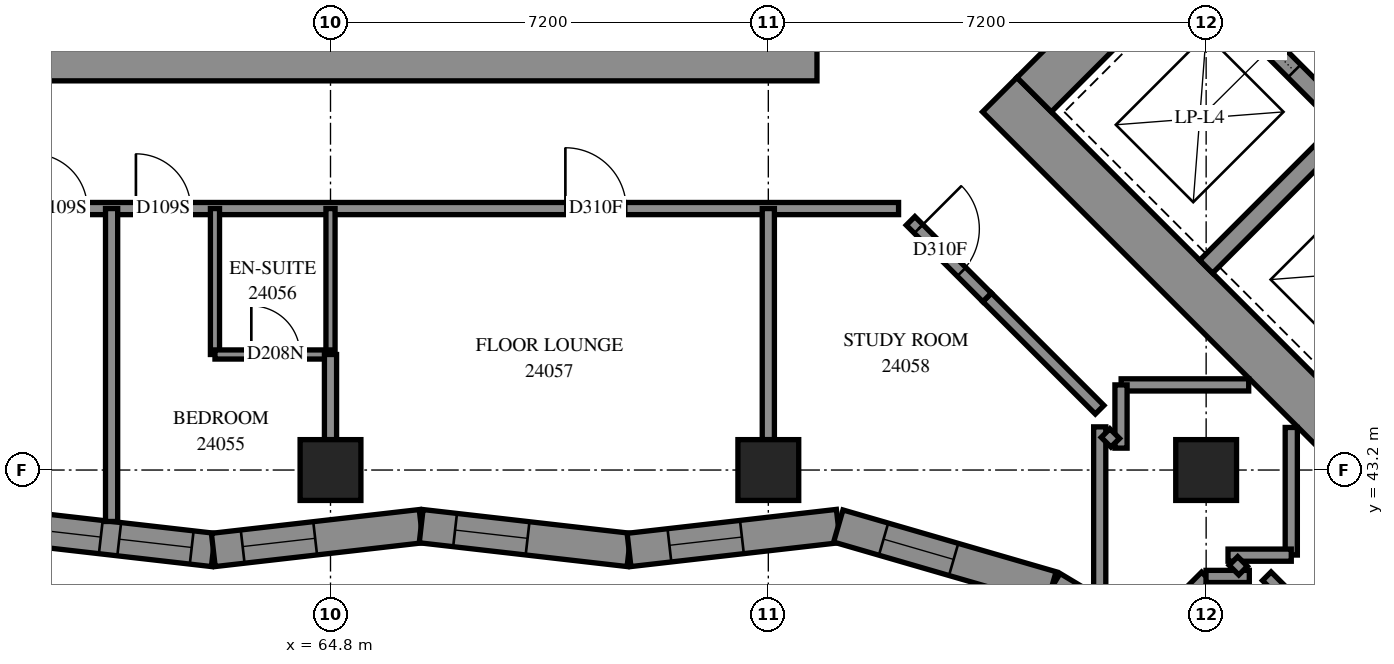
"""IFC4 building model, lengths in metres.
Left out: names, types, materials, properties, quantities, classifications, styles, units other than length and angle.
Written with IfcOpenShell. Run it as: python <this file> out.ifc"""

import sys

from ifc_helpers import new_model, si_unit, direction, frame, frame_2d, origin, origin_2d, place, context, subcontext, project, spatial, polyline, rectangle, outline, extrude, element, fill, save


model = new_model("IFC4")
c1 = context("Model", 3, precision=1e-05, world=origin(), true_north=direction((0.0, 1.0)))
c2 = subcontext(c1, "Body", "Model", "MODEL_VIEW")
j1 = project(units=[si_unit("LENGTHUNIT", "METRE"), si_unit("PLANEANGLEUNIT", "RADIAN")], contexts=[c1])
p1 = place(None, origin())
s1 = spatial("IfcSite", under=j1, at=p1, CompositionType="ELEMENT")
p2 = place(p1, origin())
s2 = spatial("IfcBuilding", under=s1, at=p2, CompositionType="ELEMENT")
p3 = place(p2, frame((0.0, 0.0, 91.4)))
s3 = spatial("IfcBuildingStorey", under=s2, at=p3, CompositionType="ELEMENT", Elevation=91.4)
for number, where, z_axis, x_axis in (
    (1, (64.8, 43.2, 0.0), (0.0, 0.0, 1.0), (1.0, 0.0, 0.0)),
    (2, (72.0, 43.2, 0.0), (0.0, 0.0, 1.0), (1.0, 0.0, 0.0)),
    (3, (79.2, 43.2, 0.0), (0.0, 0.0, 1.0), (1.0, 0.0, 0.0)),
):
    element("IfcColumn", number, at=place(p3, frame(where, z_axis=z_axis, x_axis=x_axis)), inside=s3, PredefinedType="COLUMN", context=c2, shape_type="SweptSolid", body=[
        extrude(rectangle(XDim=1.0, YDim=1.0, at=origin_2d()), origin(), (0.0, 0.0, 1.0), 3.1),
    ])
for number, where, z_axis, x_axis in (
    (4, (56.8, 50.0, -0.3), (0.0, 0.0, 1.0), (1.0, 0.0, 0.0)),
    (5, (75.806, 49.373, -0.3), (0.0, 0.0, 1.0), (0.707, -0.707, 0.0)),
):
    element("IfcWall", number, at=place(p3, frame(where, z_axis=z_axis, x_axis=x_axis)), inside=s3, PredefinedType="SHEAR", context=c2, shape_type="SweptSolid", body=[
        extrude(rectangle(XDim=16.0, YDim=0.8, at=frame_2d((8.0, 0.0))), origin(), (0.0, 0.0, 1.0), 2.7),
    ])
p4 = place(p3, frame((76.372, 49.373, -0.3), z_axis=(0.0, 0.0, 1.0), x_axis=(0.7071067812, 0.7071067812, 0.0)))
e6 = element("IfcWall", 6, at=p4, inside=s3, PredefinedType="SHEAR", context=c2, shape_type="SweptSolid", body=[
    extrude(rectangle(XDim=14.4, YDim=0.8, at=frame_2d((7.2, 0.0))), origin(), (0.0, 0.0, 1.0), 2.7),
])
p5 = place(p4, frame((4.55, 0.0, 0.3)))
e7 = element("IfcOpeningElement", 7, at=p5, cuts=e6, PredefinedType="OPENING", context=c2, shape_type="SweptSolid", body=[
    extrude(rectangle(XDim=1.1, YDim=2.1, at=frame_2d((0.55, 1.05))), frame((0.0, 0.41, 0.0), z_axis=(0.0, -1.0, 0.0), x_axis=(1.0, 0.0, 0.0)), (0.0, 0.0, 1.0), 0.82),
])
p6 = place(p4, frame((11.35, 0.0, 0.3)))
e8 = element("IfcOpeningElement", 8, at=p6, cuts=e6, PredefinedType="OPENING", context=c2, shape_type="SweptSolid", body=[
    extrude(rectangle(XDim=1.1, YDim=2.1, at=frame_2d((0.55, 1.05))), frame((0.0, 0.41, 0.0), z_axis=(0.0, -1.0, 0.0), x_axis=(1.0, 0.0, 0.0)), (0.0, 0.0, 1.0), 0.82),
])
p7 = place(p3, frame((79.2, 46.544, 0.0), z_axis=(0.0, 0.0, 1.0), x_axis=(0.7071219326, 0.7070916295, 0.0)))
e9 = element("IfcWall", 9, at=p7, inside=s3, PredefinedType="SOLIDWALL", context=c2, shape_type="SweptSolid", body=[
    extrude(rectangle(XDim=3.3, YDim=0.3, at=frame_2d((1.65, 0.0))), origin(), (0.0, 0.0, 1.0), 3.1),
])
p8 = place(p3, frame((78.988, 51.423, 0.0), z_axis=(0.0, 0.0, 1.0), x_axis=(0.7071067812, -0.7071067812, 0.0)))
e10 = element("IfcWall", 10, at=p8, inside=s3, PredefinedType="SOLIDWALL", context=c2, shape_type="SweptSolid", body=[
    extrude(rectangle(XDim=14.4, YDim=0.3, at=frame_2d((7.2, 0.0))), origin(), (0.0, 0.0, 1.0), 3.1),
])
p9 = place(p8, frame((1.25, 0.0, 0.0)))
e11 = element("IfcOpeningElement", 11, at=p9, cuts=e10, PredefinedType="OPENING", context=c2, shape_type="SweptSolid", body=[
    extrude(rectangle(XDim=1.1, YDim=2.1, at=frame_2d((0.55, 1.05))), frame((0.0, 0.16, 0.0), z_axis=(0.0, -1.0, 0.0), x_axis=(1.0, 0.0, 0.0)), (0.0, 0.0, 1.0), 0.32),
])
p10 = place(p8, frame((4.85, 0.0, 0.0)))
e12 = element("IfcOpeningElement", 12, at=p10, cuts=e10, PredefinedType="OPENING", context=c2, shape_type="SweptSolid", body=[
    extrude(rectangle(XDim=1.1, YDim=2.1, at=frame_2d((0.55, 1.05))), frame((0.0, 0.16, 0.0), z_axis=(0.0, -1.0, 0.0), x_axis=(1.0, 0.0, 0.0)), (0.0, 0.0, 1.0), 0.32),
])
p11 = place(p8, frame((8.45, 0.0, 0.0)))
e13 = element("IfcOpeningElement", 13, at=p11, cuts=e10, PredefinedType="OPENING", context=c2, shape_type="SweptSolid", body=[
    extrude(rectangle(XDim=1.1, YDim=2.1, at=frame_2d((0.55, 1.05))), frame((0.0, 0.16, 0.0), z_axis=(0.0, -1.0, 0.0), x_axis=(1.0, 0.0, 0.0)), (0.0, 0.0, 1.0), 0.32),
])
p12 = place(p8, frame((12.05, 0.0, 0.0)))
e14 = element("IfcOpeningElement", 14, at=p12, cuts=e10, PredefinedType="OPENING", context=c2, shape_type="SweptSolid", body=[
    extrude(rectangle(XDim=1.1, YDim=2.1, at=frame_2d((0.55, 1.05))), frame((0.0, 0.16, 0.0), z_axis=(0.0, -1.0, 0.0), x_axis=(1.0, 0.0, 0.0)), (0.0, 0.0, 1.0), 0.32),
])
p13 = place(p3, frame((59.455, 42.277, 0.0), z_axis=(0.0, 0.0, 1.0), x_axis=(0.9935212381, -0.1136465988, 0.0)))
e15 = element("IfcWall", 15, at=p13, inside=s3, PredefinedType="SOLIDWALL", context=c2, shape_type="SweptSolid", body=[
    extrude(outline(polyline([(0.032, -0.275), (3.472, -0.275), (3.409, 0.275), (-0.032, 0.275), (0.032, -0.275)])), origin(), (0.0, 0.0, 1.0), 3.1),
])
p14 = place(p13, frame((0.378, 0.0, 0.5)))
e16 = element("IfcOpeningElement", 16, at=p14, cuts=e15, PredefinedType="OPENING", context=c2, shape_type="SweptSolid", body=[
    extrude(rectangle(XDim=1.2, YDim=2.45, at=frame_2d((0.6, 1.225))), frame((0.0, 0.285, 0.0), z_axis=(0.0, -1.0, 0.0), x_axis=(1.0, 0.0, 0.0)), (0.0, 0.0, 1.0), 0.57),
])
p15 = place(p13, frame((1.883, 0.0, 0.5)))
e17 = element("IfcOpeningElement", 17, at=p15, cuts=e15, PredefinedType="OPENING", context=c2, shape_type="SweptSolid", body=[
    extrude(rectangle(XDim=1.2, YDim=2.45, at=frame_2d((0.6, 1.225))), frame((0.0, 0.285, 0.0), z_axis=(0.0, -1.0, 0.0), x_axis=(1.0, 0.0, 0.0)), (0.0, 0.0, 1.0), 0.57),
])
p16 = place(p3, frame((62.873, 41.886, 0.0), z_axis=(0.0, 0.0, 1.0), x_axis=(0.9935212381, 0.1136465988, 0.0)))
e18 = element("IfcWall", 18, at=p16, inside=s3, PredefinedType="SOLIDWALL", context=c2, shape_type="SweptSolid", body=[
    extrude(outline(polyline([(-0.032, -0.275), (3.409, -0.275), (3.472, 0.275), (0.032, 0.275), (-0.032, -0.275)])), origin(), (0.0, 0.0, 1.0), 3.1),
])
p17 = place(p16, frame((0.486, 0.0, 0.5)))
e19 = element("IfcOpeningElement", 19, at=p17, cuts=e18, PredefinedType="OPENING", context=c2, shape_type="SweptSolid", body=[
    extrude(rectangle(XDim=1.2, YDim=2.45, at=frame_2d((0.6, 1.225))), frame((0.0, 0.285, 0.0), z_axis=(0.0, -1.0, 0.0), x_axis=(1.0, 0.0, 0.0)), (0.0, 0.0, 1.0), 0.57),
])
p18 = place(p3, frame((66.291, 42.277, 0.0), z_axis=(0.0, 0.0, 1.0), x_axis=(0.9935212381, -0.1136465988, 0.0)))
e20 = element("IfcWall", 20, at=p18, inside=s3, PredefinedType="SOLIDWALL", context=c2, shape_type="SweptSolid", body=[
    extrude(outline(polyline([(0.032, -0.275), (3.472, -0.275), (3.409, 0.275), (-0.032, 0.275), (0.032, -0.275)])), origin(), (0.0, 0.0, 1.0), 3.1),
])
p19 = place(p18, frame((0.561, 0.0, 0.5)))
e21 = element("IfcOpeningElement", 21, at=p19, cuts=e20, PredefinedType="OPENING", context=c2, shape_type="SweptSolid", body=[
    extrude(rectangle(XDim=1.2, YDim=2.45, at=frame_2d((0.6, 1.225))), frame((0.0, 0.285, 0.0), z_axis=(0.0, -1.0, 0.0), x_axis=(1.0, 0.0, 0.0)), (0.0, 0.0, 1.0), 0.57),
])
p20 = place(p3, frame((69.709, 41.886, 0.0), z_axis=(0.0, 0.0, 1.0), x_axis=(0.9935208506, 0.1136499866, 0.0)))
e22 = element("IfcWall", 22, at=p20, inside=s3, PredefinedType="SOLIDWALL", context=c2, shape_type="SweptSolid", body=[
    extrude(outline(polyline([(-0.032, -0.275), (3.409, -0.275), (3.519, 0.275), (0.032, 0.275), (-0.032, -0.275)])), origin(), (0.0, 0.0, 1.0), 3.1),
])
p21 = place(p20, frame((0.669, 0.0, 0.5)))
e23 = element("IfcOpeningElement", 23, at=p21, cuts=e22, PredefinedType="OPENING", context=c2, shape_type="SweptSolid", body=[
    extrude(rectangle(XDim=1.2, YDim=2.45, at=frame_2d((0.6, 1.225))), frame((0.0, 0.285, 0.0), z_axis=(0.0, -1.0, 0.0), x_axis=(1.0, 0.0, 0.0)), (0.0, 0.0, 1.0), 0.57),
])
p22 = place(p3, frame((73.151, 42.279, 0.0), z_axis=(0.0, 0.0, 1.0), x_axis=(0.9604465079, -0.2784645497, 0.0)))
e24 = element("IfcWall", 24, at=p22, inside=s3, PredefinedType="SOLIDWALL", context=c2, shape_type="SweptSolid", body=[
    extrude(outline(polyline([(0.055, -0.275), (3.614, -0.275), (3.685, 0.275), (-0.055, 0.275), (0.055, -0.275)])), origin(), (0.0, 0.0, 1.0), 3.1),
])
p23 = place(p22, frame((0.775, 0.0, 0.5)))
e25 = element("IfcOpeningElement", 25, at=p23, cuts=e24, PredefinedType="OPENING", context=c2, shape_type="SweptSolid", body=[
    extrude(rectangle(XDim=1.2, YDim=2.45, at=frame_2d((0.6, 1.225))), frame((0.0, 0.285, 0.0), z_axis=(0.0, -1.0, 0.0), x_axis=(1.0, 0.0, 0.0)), (0.0, 0.0, 1.0), 0.57),
])
p24 = place(p3, frame((76.656, 41.263, 0.0), z_axis=(0.0, 0.0, 1.0), x_axis=(0.8580683787, -0.513535449, 0.0)))
e26 = element("IfcWall", 26, at=p24, inside=s3, PredefinedType="SOLIDWALL", context=c2, shape_type="SweptSolid", body=[
    extrude(outline(polyline([(0.036, -0.275), (4.104, -0.275), (4.199, 0.275), (-0.036, 0.275), (0.036, -0.275)])), origin(), (0.0, 0.0, 1.0), 3.1),
])
p25 = place(p24, frame((0.358, 0.0, 0.5)))
e27 = element("IfcOpeningElement", 27, at=p25, cuts=e26, PredefinedType="OPENING", context=c2, shape_type="SweptSolid", body=[
    extrude(rectangle(XDim=1.2, YDim=2.45, at=frame_2d((0.6, 1.225))), frame((0.0, 0.285, 0.0), z_axis=(0.0, -1.0, 0.0), x_axis=(1.0, 0.0, 0.0)), (0.0, 0.0, 1.0), 0.57),
])
p26 = place(p24, frame((2.234, 0.0, 0.5)))
e28 = element("IfcOpeningElement", 28, at=p26, cuts=e26, PredefinedType="OPENING", context=c2, shape_type="SweptSolid", body=[
    extrude(rectangle(XDim=1.2, YDim=2.45, at=frame_2d((0.6, 1.225))), frame((0.0, 0.285, 0.0), z_axis=(0.0, -1.0, 0.0), x_axis=(1.0, 0.0, 0.0)), (0.0, 0.0, 1.0), 0.57),
])
p27 = place(p3, frame((54.7, 47.5, 0.0), z_axis=(0.0, 0.0, 1.0), x_axis=(1.0, 0.0, 0.0)))
e29 = element("IfcWall", 29, at=p27, inside=s3, PredefinedType="PARTITIONING", context=c2, shape_type="SweptSolid", body=[
    extrude(rectangle(XDim=19.442, YDim=0.2, at=frame_2d((9.721, 0.0))), origin(), (0.0, 0.0, 1.0), 3.1),
])
p28 = place(p27, frame((5.2, 0.0, 0.0)))
e30 = element("IfcOpeningElement", 30, at=p28, cuts=e29, PredefinedType="OPENING", context=c2, shape_type="SweptSolid", body=[
    extrude(rectangle(XDim=0.9, YDim=2.1, at=frame_2d((0.45, 1.05))), frame((0.0, 0.11, 0.0), z_axis=(0.0, -1.0, 0.0), x_axis=(1.0, 0.0, 0.0)), (0.0, 0.0, 1.0), 0.22),
])
p29 = place(p27, frame((6.9, 0.0, 0.0)))
e31 = element("IfcOpeningElement", 31, at=p29, cuts=e29, PredefinedType="OPENING", context=c2, shape_type="SweptSolid", body=[
    extrude(rectangle(XDim=0.9, YDim=2.1, at=frame_2d((0.45, 1.05))), frame((0.0, 0.11, 0.0), z_axis=(0.0, -1.0, 0.0), x_axis=(1.0, 0.0, 0.0)), (0.0, 0.0, 1.0), 0.22),
])
p30 = place(p27, frame((13.963, 0.0, 0.0)))
e32 = element("IfcOpeningElement", 32, at=p30, cuts=e29, PredefinedType="OPENING", context=c2, shape_type="SweptSolid", body=[
    extrude(rectangle(XDim=1.0, YDim=2.1, at=frame_2d((0.5, 1.05))), frame((0.0, 0.11, 0.0), z_axis=(0.0, -1.0, 0.0), x_axis=(1.0, 0.0, 0.0)), (0.0, 0.0, 1.0), 0.22),
])
p31 = place(p3, frame((80.197, 41.453, 0.0), z_axis=(0.0, 0.0, 1.0), x_axis=(0.7071067812, -0.7071067812, 0.0)))
e33 = element("IfcWall", 33, at=p31, inside=s3, PredefinedType="PARTITIONING", context=c2, shape_type="SweptSolid", body=[
    extrude(rectangle(XDim=6.488, YDim=0.2, at=frame_2d((3.244, 0.0))), origin(), (0.0, 0.0, 1.0), 3.1),
])
p32 = place(p3, frame((61.2, 42.354, 0.0), z_axis=(0.0, 0.0, 1.0), x_axis=(0.0, 1.0, 0.0)))
e34 = element("IfcWall", 34, at=p32, inside=s3, PredefinedType="PARTITIONING", context=c2, shape_type="SweptSolid", body=[
    extrude(rectangle(XDim=5.146, YDim=0.2, at=frame_2d((2.573, 0.0))), origin(), (0.0, 0.0, 1.0), 3.1),
])
p33 = place(p3, frame((72.0, 43.7, 0.0), z_axis=(0.0, 0.0, 1.0), x_axis=(0.0, 1.0, 0.0)))
e35 = element("IfcWall", 35, at=p33, inside=s3, PredefinedType="PARTITIONING", context=c2, shape_type="SweptSolid", body=[
    extrude(rectangle(XDim=3.8, YDim=0.2, at=frame_2d((1.9, 0.0))), origin(), (0.0, 0.0, 1.0), 3.1),
])
p34 = place(p3, frame((77.45, 41.109, 0.0), z_axis=(0.0, 0.0, 1.0), x_axis=(0.0, 1.0, 0.0)))
e36 = element("IfcWall", 36, at=p34, inside=s3, PredefinedType="PARTITIONING", context=c2, shape_type="SweptSolid", body=[
    extrude(rectangle(XDim=2.801, YDim=0.2, at=frame_2d((1.401, 0.0))), origin(), (0.0, 0.0, 1.0), 3.1),
])
p35 = place(p3, frame((75.598, 46.04, 0.0), z_axis=(0.0, 0.0, 1.0), x_axis=(0.7074891043, -0.7067242512, 0.0)))
e37 = element("IfcWall", 37, at=p35, inside=s3, PredefinedType="PARTITIONING", context=c2, shape_type="SweptSolid", body=[
    extrude(rectangle(XDim=2.615, YDim=0.2, at=frame_2d((1.308, 0.0))), origin(), (0.0, 0.0, 1.0), 3.1),
])
for number, where, z_axis, x_axis in (
    (38, (62.9, 45.1, 0.0), (0.0, 0.0, 1.0), (0.0, 1.0, 0.0)),
    (39, (64.8, 45.1, 0.0), (0.0, 0.0, 1.0), (0.0, 1.0, 0.0)),
):
    element("IfcWall", number, at=place(p3, frame(where, z_axis=z_axis, x_axis=x_axis)), inside=s3, PredefinedType="PARTITIONING", context=c2, shape_type="SweptSolid", body=[
        extrude(rectangle(XDim=2.4, YDim=0.15, at=frame_2d((1.2, 0.0))), origin(), (0.0, 0.0, 1.0), 3.1),
    ])
for number, where, z_axis, x_axis in (
    (40, (77.802, 44.6, 0.0), (0.0, 0.0, 1.0), (1.0, 0.0, 0.0)),
    (41, (80.6, 41.802, 0.0), (0.0, 0.0, 1.0), (0.0, 1.0, 0.0)),
):
    element("IfcWall", number, at=place(p3, frame(where, z_axis=z_axis, x_axis=x_axis)), inside=s3, PredefinedType="PARTITIONING", context=c2, shape_type="SweptSolid", body=[
        extrude(rectangle(XDim=2.098, YDim=0.2, at=frame_2d((1.049, 0.0))), origin(), (0.0, 0.0, 1.0), 3.1),
    ])
p36 = place(p3, frame((62.9, 45.1, 0.0), z_axis=(0.0, 0.0, 1.0), x_axis=(1.0, 0.0, 0.0)))
e42 = element("IfcWall", 42, at=p36, inside=s3, PredefinedType="PARTITIONING", context=c2, shape_type="SweptSolid", body=[
    extrude(rectangle(XDim=1.9, YDim=0.15, at=frame_2d((0.95, 0.0))), origin(), (0.0, 0.0, 1.0), 3.1),
])
p37 = place(p36, frame((0.598, 0.0, 0.0)))
e43 = element("IfcOpeningElement", 43, at=p37, cuts=e42, PredefinedType="OPENING", context=c2, shape_type="SweptSolid", body=[
    extrude(rectangle(XDim=0.8, YDim=2.1, at=frame_2d((0.4, 1.05))), frame((0.0, 0.085, 0.0), z_axis=(0.0, -1.0, 0.0), x_axis=(1.0, 0.0, 0.0)), (0.0, 0.0, 1.0), 0.17),
])
p38 = place(p3, frame((74.339, 47.297, 0.0), z_axis=(0.0, 0.0, 1.0), x_axis=(0.7071067812, -0.7071067812, 0.0)))
e44 = element("IfcWall", 44, at=p38, inside=s3, PredefinedType="PARTITIONING", context=c2, shape_type="SweptSolid", body=[
    extrude(rectangle(XDim=1.779, YDim=0.2, at=frame_2d((0.889, 0.0))), origin(), (0.0, 0.0, 1.0), 3.1),
])
p39 = place(p38, frame((0.186, 0.0, 0.0)))
e45 = element("IfcOpeningElement", 45, at=p39, cuts=e44, PredefinedType="OPENING", context=c2, shape_type="SweptSolid", body=[
    extrude(rectangle(XDim=1.0, YDim=2.1, at=frame_2d((0.5, 1.05))), frame((0.0, 0.11, 0.0), z_axis=(0.0, -1.0, 0.0), x_axis=(1.0, 0.0, 0.0)), (0.0, 0.0, 1.0), 0.22),
])
p40 = place(p3, frame((64.8, 43.7, 0.0), z_axis=(0.0, 0.0, 1.0), x_axis=(0.0, 1.0, 0.0)))
e46 = element("IfcWall", 46, at=p40, inside=s3, PredefinedType="PARTITIONING", context=c2, shape_type="SweptSolid", body=[
    extrude(rectangle(XDim=1.4, YDim=0.2, at=frame_2d((0.7, 0.0))), origin(), (0.0, 0.0, 1.0), 3.1),
])
p41 = place(p3, frame((78.328, 40.583, 0.0), z_axis=(0.0, 0.0, 1.0), x_axis=(0.7071067812, 0.7071067812, 0.0)))
e47 = element("IfcWall", 47, at=p41, inside=s3, PredefinedType="PARTITIONING", context=c2, shape_type="SweptSolid", body=[
    extrude(rectangle(XDim=1.227, YDim=0.2, at=frame_2d((0.613, 0.0))), origin(), (0.0, 0.0, 1.0), 3.1),
])
for number, where, z_axis, x_axis in (
    (48, (77.8, 43.56, 0.0), (0.0, 0.0, 1.0), (0.0, 1.0, 0.0)),
    (49, (79.56, 41.8, 0.0), (0.0, 0.0, 1.0), (1.0, 0.0, 0.0)),
):
    element("IfcWall", number, at=place(p3, frame(where, z_axis=z_axis, x_axis=x_axis)), inside=s3, PredefinedType="PARTITIONING", context=c2, shape_type="SweptSolid", body=[
        extrude(rectangle(XDim=1.04, YDim=0.2, at=frame_2d((0.52, 0.0))), origin(), (0.0, 0.0, 1.0), 3.1),
    ])
p42 = place(p3, frame((79.198, 41.45, 0.0), z_axis=(0.0, 0.0, 1.0), x_axis=(1.0, 0.0, 0.0)))
e50 = element("IfcWall", 50, at=p42, inside=s3, PredefinedType="PARTITIONING", context=c2, shape_type="SweptSolid", body=[
    extrude(rectangle(XDim=0.712, YDim=0.2, at=frame_2d((0.356, 0.0))), origin(), (0.0, 0.0, 1.0), 3.1),
])
for number, where, z_axis, x_axis in (
    (51, (79.649, 41.705, 0.0), (0.0, 0.0, 1.0), (0.707, -0.707, 0.0)),
    (52, (77.546, 43.808, 0.0), (0.0, 0.0, 1.0), (0.707, -0.707, 0.0)),
):
    element("IfcWall", number, at=place(p3, frame(where, z_axis=z_axis, x_axis=x_axis)), inside=s3, PredefinedType="PARTITIONING", context=c2, shape_type="SweptSolid", body=[
        extrude(rectangle(XDim=0.225, YDim=0.2, at=frame_2d((0.112, 0.0))), origin(), (0.0, 0.0, 1.0), 3.1),
    ])
p43 = place(p14, origin())
e53 = element("IfcWindow", 53, at=p43, inside=s3, PartitioningType="SINGLE_PANEL", PredefinedType="WINDOW", context=c2, shape_type="SweptSolid", body=[
    extrude(rectangle(XDim=1.2, YDim=2.45, at=frame_2d((0.6, 1.225))), frame((0.0, 0.155, 0.0), z_axis=(0.0, -1.0, 0.0), x_axis=(1.0, 0.0, 0.0)), (0.0, 0.0, 1.0), 0.06),
])
fill(e16, e53)
p44 = place(p15, origin())
e54 = element("IfcWindow", 54, at=p44, inside=s3, PartitioningType="SINGLE_PANEL", PredefinedType="WINDOW", context=c2, shape_type="SweptSolid", body=[
    extrude(rectangle(XDim=1.2, YDim=2.45, at=frame_2d((0.6, 1.225))), frame((0.0, 0.155, 0.0), z_axis=(0.0, -1.0, 0.0), x_axis=(1.0, 0.0, 0.0)), (0.0, 0.0, 1.0), 0.06),
])
fill(e17, e54)
p45 = place(p17, origin())
e55 = element("IfcWindow", 55, at=p45, inside=s3, PartitioningType="SINGLE_PANEL", PredefinedType="WINDOW", context=c2, shape_type="SweptSolid", body=[
    extrude(rectangle(XDim=1.2, YDim=2.45, at=frame_2d((0.6, 1.225))), frame((0.0, 0.155, 0.0), z_axis=(0.0, -1.0, 0.0), x_axis=(1.0, 0.0, 0.0)), (0.0, 0.0, 1.0), 0.06),
])
fill(e19, e55)
p46 = place(p19, origin())
e56 = element("IfcWindow", 56, at=p46, inside=s3, PartitioningType="SINGLE_PANEL", PredefinedType="WINDOW", context=c2, shape_type="SweptSolid", body=[
    extrude(rectangle(XDim=1.2, YDim=2.45, at=frame_2d((0.6, 1.225))), frame((0.0, 0.155, 0.0), z_axis=(0.0, -1.0, 0.0), x_axis=(1.0, 0.0, 0.0)), (0.0, 0.0, 1.0), 0.06),
])
fill(e21, e56)
p47 = place(p21, origin())
e57 = element("IfcWindow", 57, at=p47, inside=s3, PartitioningType="SINGLE_PANEL", PredefinedType="WINDOW", context=c2, shape_type="SweptSolid", body=[
    extrude(rectangle(XDim=1.2, YDim=2.45, at=frame_2d((0.6, 1.225))), frame((0.0, 0.155, 0.0), z_axis=(0.0, -1.0, 0.0), x_axis=(1.0, 0.0, 0.0)), (0.0, 0.0, 1.0), 0.06),
])
fill(e23, e57)
p48 = place(p23, origin())
e58 = element("IfcWindow", 58, at=p48, inside=s3, PartitioningType="SINGLE_PANEL", PredefinedType="WINDOW", context=c2, shape_type="SweptSolid", body=[
    extrude(rectangle(XDim=1.2, YDim=2.45, at=frame_2d((0.6, 1.225))), frame((0.0, 0.155, 0.0), z_axis=(0.0, -1.0, 0.0), x_axis=(1.0, 0.0, 0.0)), (0.0, 0.0, 1.0), 0.06),
])
fill(e25, e58)
p49 = place(p9, origin())
e59 = element("IfcDoor", 59, at=p49, inside=s3, OperationType="SLIDING_TO_LEFT", PredefinedType="DOOR", context=c2, shape_type="SweptSolid", body=[
    extrude(rectangle(XDim=1.1, YDim=2.1, at=frame_2d((0.55, 1.05))), frame((0.0, 0.025, 0.0), z_axis=(0.0, -1.0, 0.0), x_axis=(1.0, 0.0, 0.0)), (0.0, 0.0, 1.0), 0.05),
])
fill(e11, e59)
p50 = place(p28, origin())
e60 = element("IfcDoor", 60, at=p50, inside=s3, OperationType="SINGLE_SWING_LEFT", PredefinedType="DOOR", context=c2, shape_type="SweptSolid", body=[
    extrude(rectangle(XDim=0.9, YDim=2.1, at=frame_2d((0.45, 1.05))), frame((0.0, 0.025, 0.0), z_axis=(0.0, -1.0, 0.0), x_axis=(1.0, 0.0, 0.0)), (0.0, 0.0, 1.0), 0.05),
])
fill(e30, e60)
p51 = place(p29, origin())
e61 = element("IfcDoor", 61, at=p51, inside=s3, OperationType="SINGLE_SWING_RIGHT", PredefinedType="DOOR", context=c2, shape_type="SweptSolid", body=[
    extrude(rectangle(XDim=0.9, YDim=2.1, at=frame_2d((0.45, 1.05))), frame((0.0, 0.025, 0.0), z_axis=(0.0, -1.0, 0.0), x_axis=(1.0, 0.0, 0.0)), (0.0, 0.0, 1.0), 0.05),
])
fill(e31, e61)
p52 = place(p37, origin())
e62 = element("IfcDoor", 62, at=p52, inside=s3, OperationType="SINGLE_SWING_RIGHT", PredefinedType="DOOR", context=c2, shape_type="SweptSolid", body=[
    extrude(rectangle(XDim=0.8, YDim=2.1, at=frame_2d((0.4, 1.05))), frame((0.0, 0.025, 0.0), z_axis=(0.0, -1.0, 0.0), x_axis=(1.0, 0.0, 0.0)), (0.0, 0.0, 1.0), 0.05),
])
fill(e43, e62)
p53 = place(p30, origin())
e63 = element("IfcDoor", 63, at=p53, inside=s3, OperationType="SINGLE_SWING_LEFT", PredefinedType="DOOR", context=c2, shape_type="SweptSolid", body=[
    extrude(rectangle(XDim=1.0, YDim=2.1, at=frame_2d((0.5, 1.05))), frame((0.0, 0.025, 0.0), z_axis=(0.0, -1.0, 0.0), x_axis=(1.0, 0.0, 0.0)), (0.0, 0.0, 1.0), 0.05),
])
fill(e32, e63)
p54 = place(p39, origin())
e64 = element("IfcDoor", 64, at=p54, inside=s3, OperationType="SINGLE_SWING_LEFT", PredefinedType="DOOR", context=c2, shape_type="SweptSolid", body=[
    extrude(rectangle(XDim=1.0, YDim=2.1, at=frame_2d((0.5, 1.05))), frame((0.0, 0.025, 0.0), z_axis=(0.0, -1.0, 0.0), x_axis=(1.0, 0.0, 0.0)), (0.0, 0.0, 1.0), 0.05),
])
fill(e45, e64)
save(model, sys.argv[1])
